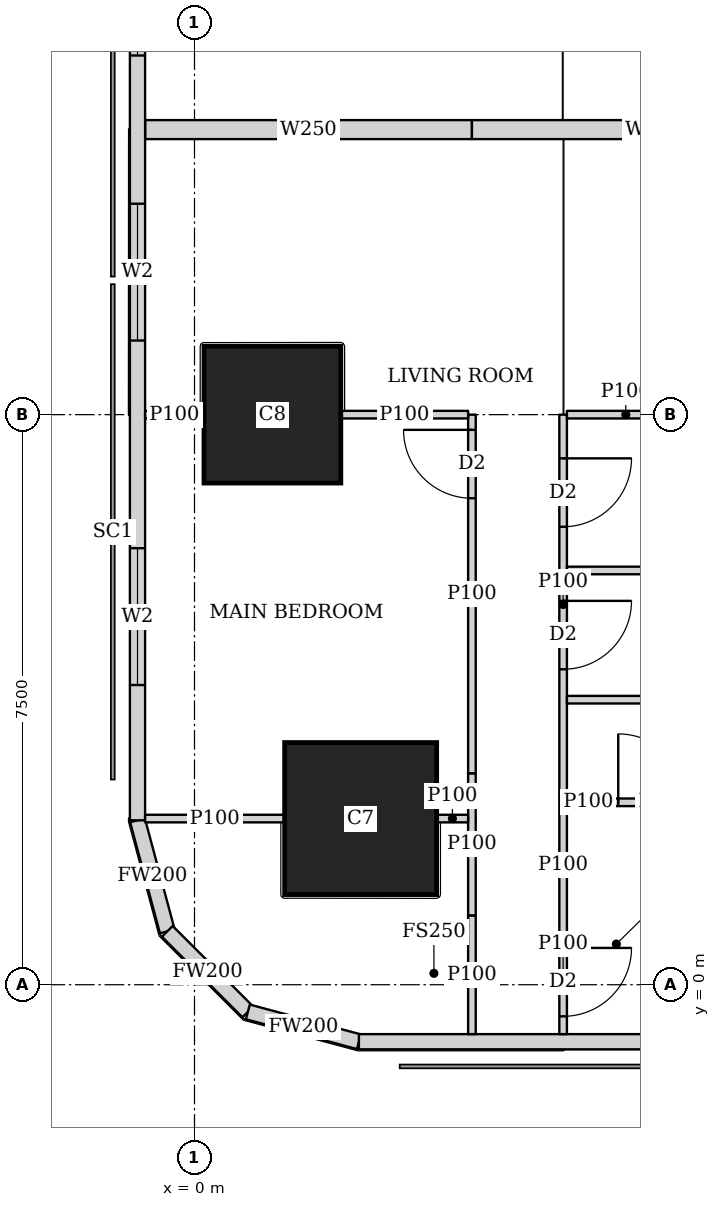
"""IFC4 building model, lengths in metres.
Left out: names, types, materials, properties, quantities, classifications, styles, units other than length and angle.
Written with IfcOpenShell. Run it as: python <this file> out.ifc"""

import sys

from ifc_helpers import new_model, si_unit, direction, frame, frame_2d, origin, origin_2d, place, context, subcontext, project, spatial, rectangle, extrude, element, fill, save


model = new_model("IFC4")
c1 = context("Model", 3, precision=1e-05, world=origin(), true_north=direction((0.0, 1.0)))
c2 = subcontext(c1, "Body", "Model", "MODEL_VIEW")
j1 = project(units=[si_unit("LENGTHUNIT", "METRE"), si_unit("PLANEANGLEUNIT", "RADIAN")], contexts=[c1])
p1 = place(None, origin())
s1 = spatial("IfcSite", under=j1, at=p1, CompositionType="ELEMENT")
p2 = place(p1, origin())
s2 = spatial("IfcBuilding", under=s1, at=p2, CompositionType="ELEMENT")
p3 = place(p2, frame((0.0, 0.0, 135.8)))
s3 = spatial("IfcBuildingStorey", under=s2, at=p3, CompositionType="ELEMENT", Elevation=135.8)
p4 = place(p3, frame((2.186, 2.186, 0.0), z_axis=(0.0, 0.0, 1.0), x_axis=(1.0, 0.0, 0.0)))
e1 = element("IfcColumn", 1, at=p4, inside=s3, PredefinedType="COLUMN", context=c2, shape_type="SweptSolid", body=[
    extrude(rectangle(XDim=2.0, YDim=2.0, at=origin_2d()), origin(), (0.0, 0.0, 1.0), 3.75),
])
p5 = place(p3, frame((1.025, 7.5, 0.0), z_axis=(0.0, 0.0, 1.0), x_axis=(1.0, 0.0, 0.0)))
e2 = element("IfcColumn", 2, at=p5, inside=s3, PredefinedType="COLUMN", context=c2, shape_type="SweptSolid", body=[
    extrude(rectangle(XDim=1.8, YDim=1.8, at=origin_2d()), origin(), (0.0, 0.0, 1.0), 3.75),
])
p6 = place(p3, frame((2.163, -0.75, 0.0), z_axis=(0.0, 0.0, 1.0), x_axis=(1.0, 0.0, 0.0)))
e3 = element("IfcWall", 3, at=p6, inside=s3, PredefinedType="SOLIDWALL", context=c2, shape_type="SweptSolid", body=[
    extrude(rectangle(XDim=45.628, YDim=0.2, at=frame_2d((22.814, 0.0))), origin(), (0.0, 0.0, 1.0), 3.5),
])
p7 = place(p6, frame((9.537, 0.0, 0.9)))
e4 = element("IfcOpeningElement", 4, at=p7, cuts=e3, PredefinedType="OPENING", context=c2, shape_type="SweptSolid", body=[
    extrude(rectangle(XDim=1.8, YDim=1.5, at=frame_2d((0.9, 0.75))), frame((0.0, 0.11, 0.0), z_axis=(0.0, -1.0, 0.0), x_axis=(1.0, 0.0, 0.0)), (0.0, 0.0, 1.0), 0.22),
])
p8 = place(p6, frame((13.137, 0.0, 0.9)))
e5 = element("IfcOpeningElement", 5, at=p8, cuts=e3, PredefinedType="OPENING", context=c2, shape_type="SweptSolid", body=[
    extrude(rectangle(XDim=1.8, YDim=1.5, at=frame_2d((0.9, 0.75))), frame((0.0, 0.11, 0.0), z_axis=(0.0, -1.0, 0.0), x_axis=(1.0, 0.0, 0.0)), (0.0, 0.0, 1.0), 0.22),
])
p9 = place(p6, frame((16.737, 0.0, 0.9)))
e6 = element("IfcOpeningElement", 6, at=p9, cuts=e3, PredefinedType="OPENING", context=c2, shape_type="SweptSolid", body=[
    extrude(rectangle(XDim=1.8, YDim=1.5, at=frame_2d((0.9, 0.75))), frame((0.0, 0.11, 0.0), z_axis=(0.0, -1.0, 0.0), x_axis=(1.0, 0.0, 0.0)), (0.0, 0.0, 1.0), 0.22),
])
p10 = place(p6, frame((20.337, 0.0, 0.9)))
e7 = element("IfcOpeningElement", 7, at=p10, cuts=e3, PredefinedType="OPENING", context=c2, shape_type="SweptSolid", body=[
    extrude(rectangle(XDim=1.8, YDim=1.5, at=frame_2d((0.9, 0.75))), frame((0.0, 0.11, 0.0), z_axis=(0.0, -1.0, 0.0), x_axis=(1.0, 0.0, 0.0)), (0.0, 0.0, 1.0), 0.22),
])
p11 = place(p6, frame((23.937, 0.0, 0.9)))
e8 = element("IfcOpeningElement", 8, at=p11, cuts=e3, PredefinedType="OPENING", context=c2, shape_type="SweptSolid", body=[
    extrude(rectangle(XDim=1.8, YDim=1.5, at=frame_2d((0.9, 0.75))), frame((0.0, 0.11, 0.0), z_axis=(0.0, -1.0, 0.0), x_axis=(1.0, 0.0, 0.0)), (0.0, 0.0, 1.0), 0.22),
])
p12 = place(p6, frame((27.537, 0.0, 0.9)))
e9 = element("IfcOpeningElement", 9, at=p12, cuts=e3, PredefinedType="OPENING", context=c2, shape_type="SweptSolid", body=[
    extrude(rectangle(XDim=1.8, YDim=1.5, at=frame_2d((0.9, 0.75))), frame((0.0, 0.11, 0.0), z_axis=(0.0, -1.0, 0.0), x_axis=(1.0, 0.0, 0.0)), (0.0, 0.0, 1.0), 0.22),
])
p13 = place(p6, frame((31.137, 0.0, 0.9)))
e10 = element("IfcOpeningElement", 10, at=p13, cuts=e3, PredefinedType="OPENING", context=c2, shape_type="SweptSolid", body=[
    extrude(rectangle(XDim=1.8, YDim=1.5, at=frame_2d((0.9, 0.75))), frame((0.0, 0.11, 0.0), z_axis=(0.0, -1.0, 0.0), x_axis=(1.0, 0.0, 0.0)), (0.0, 0.0, 1.0), 0.22),
])
p14 = place(p6, frame((34.737, 0.0, 0.9)))
e11 = element("IfcOpeningElement", 11, at=p14, cuts=e3, PredefinedType="OPENING", context=c2, shape_type="SweptSolid", body=[
    extrude(rectangle(XDim=1.8, YDim=1.5, at=frame_2d((0.9, 0.75))), frame((0.0, 0.11, 0.0), z_axis=(0.0, -1.0, 0.0), x_axis=(1.0, 0.0, 0.0)), (0.0, 0.0, 1.0), 0.22),
])
p15 = place(p3, frame((-0.75, 42.837, 0.0), z_axis=(0.0, 0.0, 1.0), x_axis=(0.0, -1.0, 0.0)))
e12 = element("IfcWall", 12, at=p15, inside=s3, PredefinedType="SOLIDWALL", context=c2, shape_type="SweptSolid", body=[
    extrude(rectangle(XDim=40.674, YDim=0.2, at=frame_2d((20.337, 0.0))), origin(), (0.0, 0.0, 1.0), 3.5),
])
p16 = place(p15, frame((1.78, 0.0, 0.9)))
e13 = element("IfcOpeningElement", 13, at=p16, cuts=e12, PredefinedType="OPENING", context=c2, shape_type="SweptSolid", body=[
    extrude(rectangle(XDim=1.8, YDim=1.5, at=frame_2d((0.9, 0.75))), frame((0.0, 0.11, 0.0), z_axis=(0.0, -1.0, 0.0), x_axis=(1.0, 0.0, 0.0)), (0.0, 0.0, 1.0), 0.22),
])
p17 = place(p15, frame((6.312, 0.0, 0.9)))
e14 = element("IfcOpeningElement", 14, at=p17, cuts=e12, PredefinedType="OPENING", context=c2, shape_type="SweptSolid", body=[
    extrude(rectangle(XDim=1.8, YDim=1.5, at=frame_2d((0.9, 0.75))), frame((0.0, 0.11, 0.0), z_axis=(0.0, -1.0, 0.0), x_axis=(1.0, 0.0, 0.0)), (0.0, 0.0, 1.0), 0.22),
])
p18 = place(p15, frame((10.062, 0.0, 0.9)))
e15 = element("IfcOpeningElement", 15, at=p18, cuts=e12, PredefinedType="OPENING", context=c2, shape_type="SweptSolid", body=[
    extrude(rectangle(XDim=1.8, YDim=1.5, at=frame_2d((0.9, 0.75))), frame((0.0, 0.11, 0.0), z_axis=(0.0, -1.0, 0.0), x_axis=(1.0, 0.0, 0.0)), (0.0, 0.0, 1.0), 0.22),
])
p19 = place(p15, frame((13.812, 0.0, 0.9)))
e16 = element("IfcOpeningElement", 16, at=p19, cuts=e12, PredefinedType="OPENING", context=c2, shape_type="SweptSolid", body=[
    extrude(rectangle(XDim=1.8, YDim=1.5, at=frame_2d((0.9, 0.75))), frame((0.0, 0.11, 0.0), z_axis=(0.0, -1.0, 0.0), x_axis=(1.0, 0.0, 0.0)), (0.0, 0.0, 1.0), 0.22),
])
p20 = place(p15, frame((17.562, 0.0, 0.9)))
e17 = element("IfcOpeningElement", 17, at=p20, cuts=e12, PredefinedType="OPENING", context=c2, shape_type="SweptSolid", body=[
    extrude(rectangle(XDim=1.8, YDim=1.5, at=frame_2d((0.9, 0.75))), frame((0.0, 0.11, 0.0), z_axis=(0.0, -1.0, 0.0), x_axis=(1.0, 0.0, 0.0)), (0.0, 0.0, 1.0), 0.22),
])
p21 = place(p15, frame((21.312, 0.0, 0.9)))
e18 = element("IfcOpeningElement", 18, at=p21, cuts=e12, PredefinedType="OPENING", context=c2, shape_type="SweptSolid", body=[
    extrude(rectangle(XDim=1.8, YDim=1.5, at=frame_2d((0.9, 0.75))), frame((0.0, 0.11, 0.0), z_axis=(0.0, -1.0, 0.0), x_axis=(1.0, 0.0, 0.0)), (0.0, 0.0, 1.0), 0.22),
])
p22 = place(p15, frame((25.062, 0.0, 0.9)))
e19 = element("IfcOpeningElement", 19, at=p22, cuts=e12, PredefinedType="OPENING", context=c2, shape_type="SweptSolid", body=[
    extrude(rectangle(XDim=1.8, YDim=1.5, at=frame_2d((0.9, 0.75))), frame((0.0, 0.11, 0.0), z_axis=(0.0, -1.0, 0.0), x_axis=(1.0, 0.0, 0.0)), (0.0, 0.0, 1.0), 0.22),
])
p23 = place(p15, frame((28.812, 0.0, 0.9)))
e20 = element("IfcOpeningElement", 20, at=p23, cuts=e12, PredefinedType="OPENING", context=c2, shape_type="SweptSolid", body=[
    extrude(rectangle(XDim=1.8, YDim=1.5, at=frame_2d((0.9, 0.75))), frame((0.0, 0.11, 0.0), z_axis=(0.0, -1.0, 0.0), x_axis=(1.0, 0.0, 0.0)), (0.0, 0.0, 1.0), 0.22),
])
p24 = place(p15, frame((32.562, 0.0, 0.9)))
e21 = element("IfcOpeningElement", 21, at=p24, cuts=e12, PredefinedType="OPENING", context=c2, shape_type="SweptSolid", body=[
    extrude(rectangle(XDim=1.8, YDim=1.5, at=frame_2d((0.9, 0.75))), frame((0.0, 0.11, 0.0), z_axis=(0.0, -1.0, 0.0), x_axis=(1.0, 0.0, 0.0)), (0.0, 0.0, 1.0), 0.22),
])
p25 = place(p15, frame((37.094, 0.0, 0.9)))
e22 = element("IfcOpeningElement", 22, at=p25, cuts=e12, PredefinedType="OPENING", context=c2, shape_type="SweptSolid", body=[
    extrude(rectangle(XDim=1.8, YDim=1.5, at=frame_2d((0.9, 0.75))), frame((0.0, 0.11, 0.0), z_axis=(0.0, -1.0, 0.0), x_axis=(1.0, 0.0, 0.0)), (0.0, 0.0, 1.0), 0.22),
])
p26 = place(p3, frame((-0.75, 2.163, 0.0), z_axis=(0.0, 0.0, 1.0), x_axis=(0.259168954497, -0.965832000415, 0.0)))
e23 = element("IfcWall", 23, at=p26, inside=s3, PredefinedType="SOLIDWALL", context=c2, shape_type="SweptSolid", body=[
    extrude(rectangle(XDim=1.513, YDim=0.2, at=frame_2d((0.756, 0.0))), origin(), (0.0, 0.0, 1.0), 3.5),
])
p27 = place(p3, frame((-0.358, 0.702, 0.0), z_axis=(0.0, 0.0, 1.0), x_axis=(0.707106781187, -0.707106781187, 0.0)))
e24 = element("IfcWall", 24, at=p27, inside=s3, PredefinedType="SOLIDWALL", context=c2, shape_type="SweptSolid", body=[
    extrude(rectangle(XDim=1.499, YDim=0.2, at=frame_2d((0.75, 0.0))), origin(), (0.0, 0.0, 1.0), 3.5),
])
p28 = place(p3, frame((0.702, -0.358, 0.0), z_axis=(0.0, 0.0, 1.0), x_axis=(0.965832000415, -0.259168954497, 0.0)))
e25 = element("IfcWall", 25, at=p28, inside=s3, PredefinedType="SOLIDWALL", context=c2, shape_type="SweptSolid", body=[
    extrude(rectangle(XDim=1.513, YDim=0.2, at=frame_2d((0.756, 0.0))), origin(), (0.0, 0.0, 1.0), 3.5),
])
p29 = place(p3, frame((3.65, -0.65, 0.0), z_axis=(0.0, 0.0, 1.0), x_axis=(0.0, 1.0, 0.0)))
e26 = element("IfcWall", 26, at=p29, inside=s3, PredefinedType="PARTITIONING", context=c2, shape_type="SweptSolid", body=[
    extrude(rectangle(XDim=1.562, YDim=0.1, at=frame_2d((0.781, 0.0))), origin(), (0.0, 0.0, 1.0), 3.5),
])
p30 = place(p3, frame((3.65, 0.912, 0.0), z_axis=(0.0, 0.0, 1.0), x_axis=(0.0, 1.0, 0.0)))
e27 = element("IfcWall", 27, at=p30, inside=s3, PredefinedType="PARTITIONING", context=c2, shape_type="SweptSolid", body=[
    extrude(rectangle(XDim=1.87, YDim=0.1, at=frame_2d((0.935, 0.0))), origin(), (0.0, 0.0, 1.0), 2.1),
])
p31 = place(p3, frame((3.65, 2.782, 0.0), z_axis=(0.0, 0.0, 1.0), x_axis=(0.0, 1.0, 0.0)))
e28 = element("IfcWall", 28, at=p31, inside=s3, PredefinedType="PARTITIONING", context=c2, shape_type="SweptSolid", body=[
    extrude(rectangle(XDim=4.718, YDim=0.1, at=frame_2d((2.359, 0.0))), origin(), (0.0, 0.0, 1.0), 3.5),
])
p32 = place(p31, frame((3.618, 0.0, 0.0)))
e29 = element("IfcOpeningElement", 29, at=p32, cuts=e28, PredefinedType="OPENING", context=c2, shape_type="SweptSolid", body=[
    extrude(rectangle(XDim=0.9, YDim=2.1, at=frame_2d((0.45, 1.05))), frame((0.0, 0.06, 0.0), z_axis=(0.0, -1.0, 0.0), x_axis=(1.0, 0.0, 0.0)), (0.0, 0.0, 1.0), 0.12),
])
p33 = place(p3, frame((4.85, -0.65, 0.0), z_axis=(0.0, 0.0, 1.0), x_axis=(0.0, 1.0, 0.0)))
e30 = element("IfcWall", 30, at=p33, inside=s3, PredefinedType="PARTITIONING", context=c2, shape_type="SweptSolid", body=[
    extrude(rectangle(XDim=1.284, YDim=0.1, at=frame_2d((0.642, 0.0))), origin(), (0.0, 0.0, 1.0), 3.5),
])
p34 = place(p33, frame((0.234, 0.0, 0.0)))
e31 = element("IfcOpeningElement", 31, at=p34, cuts=e30, PredefinedType="OPENING", context=c2, shape_type="SweptSolid", body=[
    extrude(rectangle(XDim=0.9, YDim=2.1, at=frame_2d((0.45, 1.05))), frame((0.0, 0.06, 0.0), z_axis=(0.0, -1.0, 0.0), x_axis=(1.0, 0.0, 0.0)), (0.0, 0.0, 1.0), 0.12),
])
p35 = place(p3, frame((4.85, 0.634, 0.0), z_axis=(0.0, 0.0, 1.0), x_axis=(0.0, 1.0, 0.0)))
e32 = element("IfcWall", 32, at=p35, inside=s3, PredefinedType="PARTITIONING", context=c2, shape_type="SweptSolid", body=[
    extrude(rectangle(XDim=1.871, YDim=0.1, at=frame_2d((0.936, 0.0))), origin(), (0.0, 0.0, 1.0), 2.1),
])
p36 = place(p3, frame((4.85, 2.505, 0.0), z_axis=(0.0, 0.0, 1.0), x_axis=(0.0, 1.0, 0.0)))
e33 = element("IfcWall", 33, at=p36, inside=s3, PredefinedType="PARTITIONING", context=c2, shape_type="SweptSolid", body=[
    extrude(rectangle(XDim=4.995, YDim=0.1, at=frame_2d((2.498, 0.0))), origin(), (0.0, 0.0, 1.0), 3.5),
])
p37 = place(p36, frame((3.52, 0.0, 0.0)))
e34 = element("IfcOpeningElement", 34, at=p37, cuts=e33, PredefinedType="OPENING", context=c2, shape_type="SweptSolid", body=[
    extrude(rectangle(XDim=0.9, YDim=2.1, at=frame_2d((0.45, 1.05))), frame((0.0, 0.06, 0.0), z_axis=(0.0, -1.0, 0.0), x_axis=(1.0, 0.0, 0.0)), (0.0, 0.0, 1.0), 0.12),
])
p38 = place(p36, frame((1.645, 0.0, 0.0)))
e35 = element("IfcOpeningElement", 35, at=p38, cuts=e33, PredefinedType="OPENING", context=c2, shape_type="SweptSolid", body=[
    extrude(rectangle(XDim=0.9, YDim=2.1, at=frame_2d((0.45, 1.05))), frame((0.0, 0.06, 0.0), z_axis=(0.0, -1.0, 0.0), x_axis=(1.0, 0.0, 0.0)), (0.0, 0.0, 1.0), 0.12),
])
p39 = place(p3, frame((-0.65, 2.186, 0.0), z_axis=(0.0, 0.0, 1.0), x_axis=(1.0, 0.0, 0.0)))
e36 = element("IfcWall", 36, at=p39, inside=s3, PredefinedType="PARTITIONING", context=c2, shape_type="SweptSolid", body=[
    extrude(rectangle(XDim=1.835, YDim=0.1, at=frame_2d((0.917, 0.0))), origin(), (0.0, 0.0, 1.0), 3.5),
])
p40 = place(p3, frame((3.187, 2.186, 0.0), z_axis=(0.0, 0.0, 1.0), x_axis=(1.0, 0.0, 0.0)))
e37 = element("IfcWall", 37, at=p40, inside=s3, PredefinedType="PARTITIONING", context=c2, shape_type="SweptSolid", body=[
    extrude(rectangle(XDim=0.413, YDim=0.1, at=frame_2d((0.207, 0.0))), origin(), (0.0, 0.0, 1.0), 2.1),
])
p41 = place(p3, frame((-0.65, 7.5, 0.0), z_axis=(0.0, 0.0, 1.0), x_axis=(1.0, 0.0, 0.0)))
e38 = element("IfcWall", 38, at=p41, inside=s3, PredefinedType="PARTITIONING", context=c2, shape_type="SweptSolid", body=[
    extrude(rectangle(XDim=0.774, YDim=0.1, at=frame_2d((0.387, 0.0))), origin(), (0.0, 0.0, 1.0), 3.5),
])
p42 = place(p3, frame((1.926, 7.5, 0.0), z_axis=(0.0, 0.0, 1.0), x_axis=(1.0, 0.0, 0.0)))
e39 = element("IfcWall", 39, at=p42, inside=s3, PredefinedType="PARTITIONING", context=c2, shape_type="SweptSolid", body=[
    extrude(rectangle(XDim=1.674, YDim=0.1, at=frame_2d((0.837, 0.0))), origin(), (0.0, 0.0, 1.0), 2.1),
])
p43 = place(p3, frame((4.9, 3.75, 0.0), z_axis=(0.0, 0.0, 1.0), x_axis=(1.0, 0.0, 0.0)))
e40 = element("IfcWall", 40, at=p43, inside=s3, PredefinedType="PARTITIONING", context=c2, shape_type="SweptSolid", body=[
    extrude(rectangle(XDim=3.525, YDim=0.1, at=frame_2d((1.763, 0.0))), origin(), (0.0, 0.0, 1.0), 3.5),
])
p44 = place(p3, frame((4.9, 7.5, 0.0), z_axis=(0.0, 0.0, 1.0), x_axis=(1.0, 0.0, 0.0)))
e41 = element("IfcWall", 41, at=p44, inside=s3, PredefinedType="PARTITIONING", context=c2, shape_type="SweptSolid", body=[
    extrude(rectangle(XDim=1.549, YDim=0.1, at=frame_2d((0.774, 0.0))), origin(), (0.0, 0.0, 1.0), 3.5),
])
p45 = place(p3, frame((4.9, 5.45, 0.0), z_axis=(0.0, 0.0, 1.0), x_axis=(1.0, 0.0, 0.0)))
e42 = element("IfcWall", 42, at=p45, inside=s3, PredefinedType="PARTITIONING", context=c2, shape_type="SweptSolid", body=[
    extrude(rectangle(XDim=3.525, YDim=0.1, at=frame_2d((1.763, 0.0))), origin(), (0.0, 0.0, 1.0), 3.5),
])
p46 = place(p3, frame((-0.65, 11.25, 0.0), z_axis=(0.0, 0.0, 1.0), x_axis=(1.0, 0.0, 0.0)))
e43 = element("IfcWall", 43, at=p46, inside=s3, PredefinedType="SOLIDWALL", context=c2, shape_type="SweptSolid", body=[
    extrude(rectangle(XDim=4.3, YDim=0.25, at=frame_2d((2.15, 0.0))), origin(), (0.0, 0.0, 1.0), 2.1),
])
p47 = place(p3, frame((3.65, 11.25, 0.0), z_axis=(0.0, 0.0, 1.0), x_axis=(1.0, 0.0, 0.0)))
e44 = element("IfcWall", 44, at=p47, inside=s3, PredefinedType="SOLIDWALL", context=c2, shape_type="SweptSolid", body=[
    extrude(rectangle(XDim=4.775, YDim=0.25, at=frame_2d((2.388, 0.0))), origin(), (0.0, 0.0, 1.0), 3.5),
])
p48 = place(p3, frame((5.467, 2.4, 0.0), z_axis=(0.0, 0.0, 1.0), x_axis=(1.0, 0.0, 0.0)))
e45 = element("IfcWall", 45, at=p48, inside=s3, PredefinedType="PARTITIONING", context=c2, shape_type="SweptSolid", body=[
    extrude(rectangle(XDim=2.958, YDim=0.1, at=frame_2d((1.479, 0.0))), origin(), (0.0, 0.0, 1.0), 3.5),
])
p49 = place(p48, frame((0.108, 0.0, 0.0)))
e46 = element("IfcOpeningElement", 46, at=p49, cuts=e45, PredefinedType="OPENING", context=c2, shape_type="SweptSolid", body=[
    extrude(rectangle(XDim=0.9, YDim=2.1, at=frame_2d((0.45, 1.05))), frame((0.0, 0.06, 0.0), z_axis=(0.0, -1.0, 0.0), x_axis=(1.0, 0.0, 0.0)), (0.0, 0.0, 1.0), 0.12),
])
p50 = place(p3, frame((5.467, 2.4, 0.0), z_axis=(0.0, 0.0, 1.0), x_axis=(-1.0, 0.0, 0.0)))
e47 = element("IfcWall", 47, at=p50, inside=s3, PredefinedType="PARTITIONING", context=c2, shape_type="SweptSolid", body=[
    extrude(rectangle(XDim=0.567, YDim=0.1, at=frame_2d((0.284, 0.0))), origin(), (0.0, 0.0, 1.0), 2.1),
])
p51 = place(p23, origin())
e48 = element("IfcWindow", 48, at=p51, inside=s3, PartitioningType="SINGLE_PANEL", PredefinedType="WINDOW", context=c2, shape_type="SweptSolid", body=[
    extrude(rectangle(XDim=1.8, YDim=1.5, at=frame_2d((0.9, 0.75))), frame((0.0, 0.03, 0.0), z_axis=(0.0, -1.0, 0.0), x_axis=(1.0, 0.0, 0.0)), (0.0, 0.0, 1.0), 0.06),
])
fill(e20, e48)
p52 = place(p24, origin())
e49 = element("IfcWindow", 49, at=p52, inside=s3, PartitioningType="SINGLE_PANEL", PredefinedType="WINDOW", context=c2, shape_type="SweptSolid", body=[
    extrude(rectangle(XDim=1.8, YDim=1.5, at=frame_2d((0.9, 0.75))), frame((0.0, 0.03, 0.0), z_axis=(0.0, -1.0, 0.0), x_axis=(1.0, 0.0, 0.0)), (0.0, 0.0, 1.0), 0.06),
])
fill(e21, e49)
p53 = place(p25, origin())
e50 = element("IfcWindow", 50, at=p53, inside=s3, PartitioningType="SINGLE_PANEL", PredefinedType="WINDOW", context=c2, shape_type="SweptSolid", body=[
    extrude(rectangle(XDim=1.8, YDim=1.5, at=frame_2d((0.9, 0.75))), frame((0.0, 0.03, 0.0), z_axis=(0.0, -1.0, 0.0), x_axis=(1.0, 0.0, 0.0)), (0.0, 0.0, 1.0), 0.06),
])
fill(e22, e50)
p54 = place(p32, origin())
e51 = element("IfcDoor", 51, at=p54, inside=s3, OperationType="SINGLE_SWING_RIGHT", PredefinedType="DOOR", context=c2, shape_type="SweptSolid", body=[
    extrude(rectangle(XDim=0.9, YDim=2.1, at=frame_2d((0.45, 1.05))), frame((0.0, 0.025, 0.0), z_axis=(0.0, -1.0, 0.0), x_axis=(1.0, 0.0, 0.0)), (0.0, 0.0, 1.0), 0.05),
])
fill(e29, e51)
p55 = place(p37, origin())
e52 = element("IfcDoor", 52, at=p55, inside=s3, OperationType="SINGLE_SWING_LEFT", PredefinedType="DOOR", context=c2, shape_type="SweptSolid", body=[
    extrude(rectangle(XDim=0.9, YDim=2.1, at=frame_2d((0.45, 1.05))), frame((0.0, 0.025, 0.0), z_axis=(0.0, -1.0, 0.0), x_axis=(1.0, 0.0, 0.0)), (0.0, 0.0, 1.0), 0.05),
])
fill(e34, e52)
p56 = place(p34, origin())
e53 = element("IfcDoor", 53, at=p56, inside=s3, OperationType="SINGLE_SWING_LEFT", PredefinedType="DOOR", context=c2, shape_type="SweptSolid", body=[
    extrude(rectangle(XDim=0.9, YDim=2.1, at=frame_2d((0.45, 1.05))), frame((0.0, 0.025, 0.0), z_axis=(0.0, -1.0, 0.0), x_axis=(1.0, 0.0, 0.0)), (0.0, 0.0, 1.0), 0.05),
])
fill(e31, e53)
p57 = place(p38, origin())
e54 = element("IfcDoor", 54, at=p57, inside=s3, OperationType="SINGLE_SWING_LEFT", PredefinedType="DOOR", context=c2, shape_type="SweptSolid", body=[
    extrude(rectangle(XDim=0.9, YDim=2.1, at=frame_2d((0.45, 1.05))), frame((0.0, 0.025, 0.0), z_axis=(0.0, -1.0, 0.0), x_axis=(1.0, 0.0, 0.0)), (0.0, 0.0, 1.0), 0.05),
])
fill(e35, e54)
p58 = place(p49, origin())
e55 = element("IfcDoor", 55, at=p58, inside=s3, OperationType="SINGLE_SWING_LEFT", PredefinedType="DOOR", context=c2, shape_type="SweptSolid", body=[
    extrude(rectangle(XDim=0.9, YDim=2.1, at=frame_2d((0.45, 1.05))), frame((0.0, 0.025, 0.0), z_axis=(0.0, -1.0, 0.0), x_axis=(1.0, 0.0, 0.0)), (0.0, 0.0, 1.0), 0.05),
])
fill(e46, e55)
save(model, sys.argv[1])
